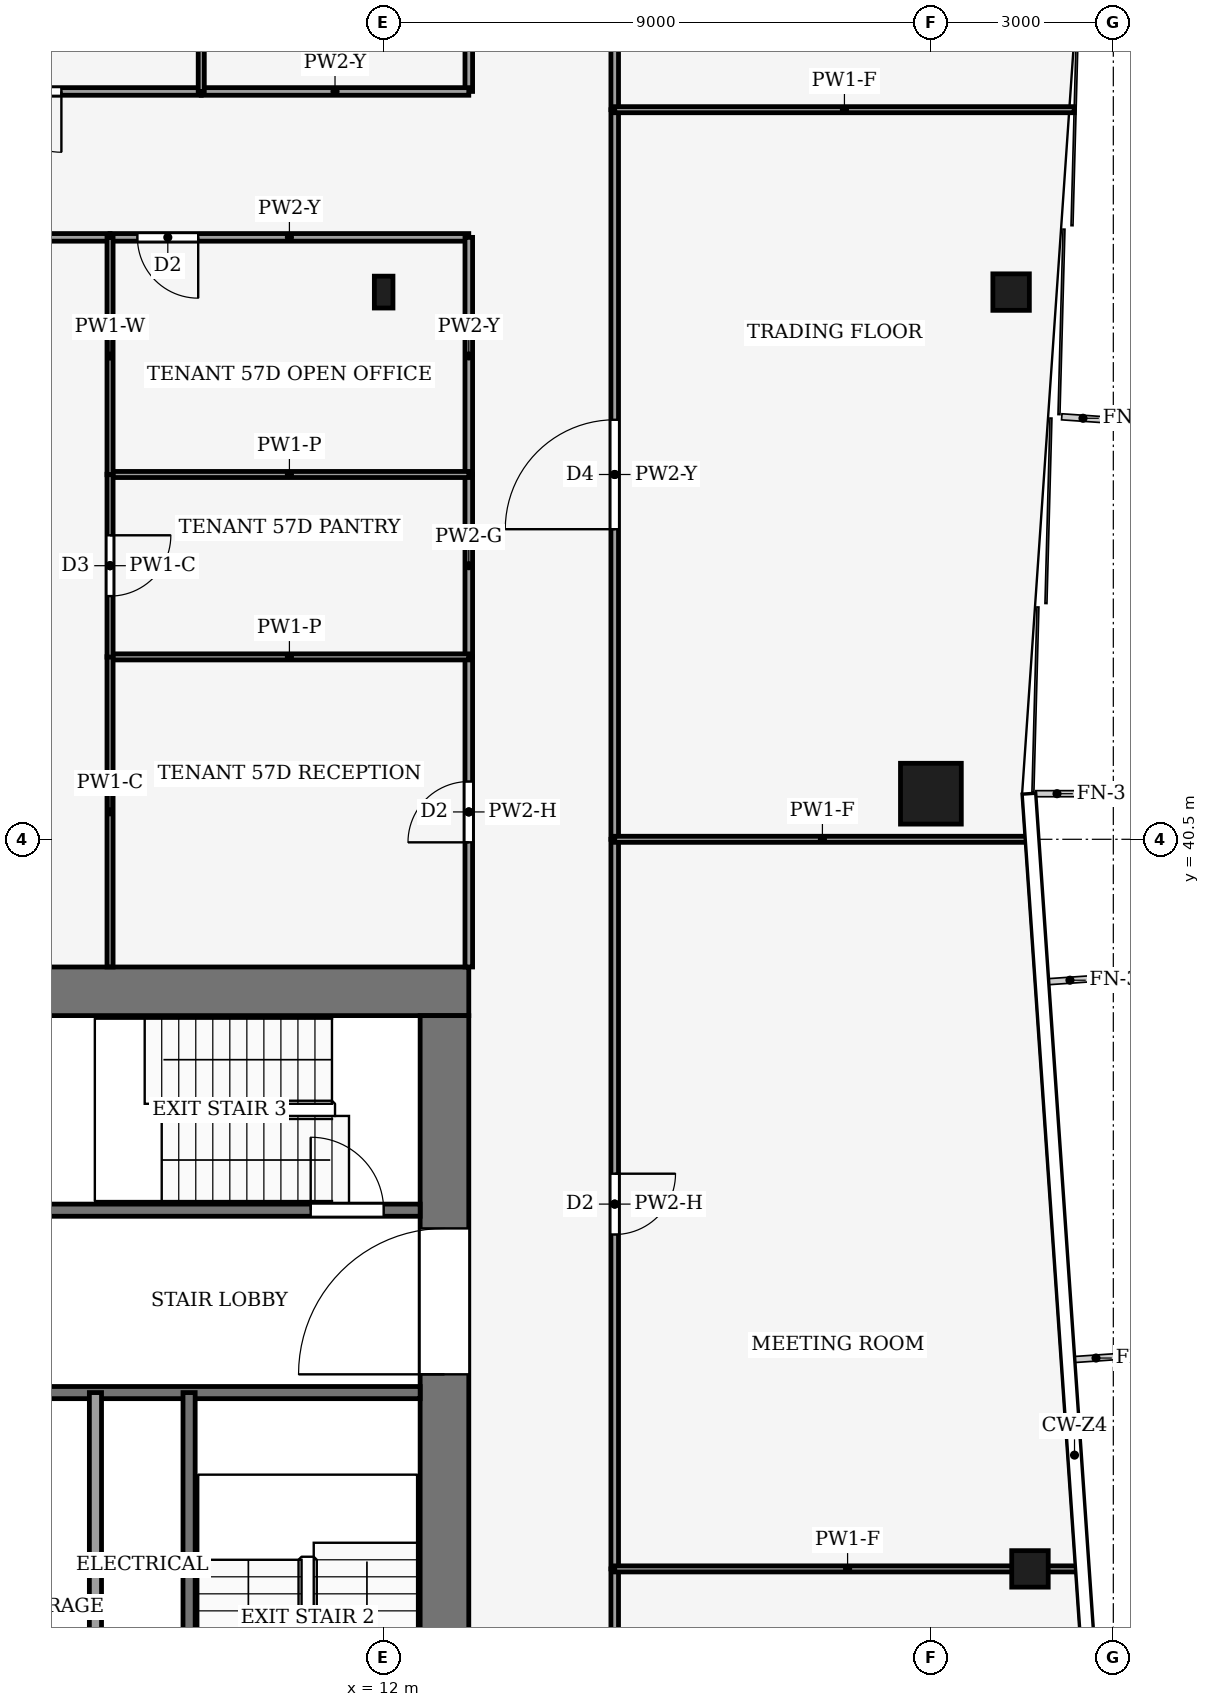
"""IFC4 building model, lengths in metres.
Left out: names, types, materials, properties, quantities, classifications, styles, units other than length and angle.
Written with IfcOpenShell. Run it as: python <this file> out.ifc"""

import sys

from ifc_helpers import new_model, si_unit, direction, frame, frame_2d, origin, origin_2d, place, context, subcontext, project, spatial, rectangle, hollow_rectangle, i_section, extrude, element, fill, save


model = new_model("IFC4")
c1 = context("Model", 3, precision=1e-05, world=origin(), true_north=direction((0.0, 1.0)))
c2 = subcontext(c1, "Body", "Model", "MODEL_VIEW")
j1 = project(units=[si_unit("LENGTHUNIT", "METRE"), si_unit("PLANEANGLEUNIT", "RADIAN")], contexts=[c1])
p1 = place(None, origin())
s1 = spatial("IfcSite", under=j1, at=p1, CompositionType="ELEMENT")
p2 = place(p1, origin())
s2 = spatial("IfcBuilding", under=s1, at=p2, CompositionType="ELEMENT")
p3 = place(p2, frame((0.0, 0.0, 250.0)))
s3 = spatial("IfcBuildingStorey", under=s2, at=p3, CompositionType="ELEMENT", Elevation=250.0)
p4 = place(p3, frame((-13.4, 38.0, -0.13), z_axis=(0.0, 0.0, 1.0), x_axis=(1.0, 0.0, 0.0)))
e1 = element("IfcWall", 1, at=p4, inside=s3, PredefinedType="SHEAR", context=c2, shape_type="SweptSolid", body=[
    extrude(rectangle(XDim=26.8, YDim=0.8, at=frame_2d((13.4, 0.0))), origin(), (0.0, 0.0, 1.0), 4.0),
])
p5 = place(p3, frame((13.0, 18.4, -0.13), z_axis=(0.0, 0.0, 1.0), x_axis=(0.0, 1.0, 0.0)))
e2 = element("IfcWall", 2, at=p5, inside=s3, PredefinedType="SHEAR", context=c2, shape_type="SweptSolid", body=[
    extrude(rectangle(XDim=19.2, YDim=0.8, at=frame_2d((9.6, 0.0))), origin(), (0.0, 0.0, 1.0), 4.0),
])
p6 = place(p5, frame((2.8, 0.0, 0.13)))
e3 = element("IfcOpeningElement", 3, at=p6, cuts=e2, PredefinedType="OPENING", context=c2, shape_type="SweptSolid", body=[
    extrude(rectangle(XDim=2.4, YDim=2.4, at=frame_2d((1.2, 1.2))), frame((0.0, 0.41, 0.0), z_axis=(0.0, -1.0, 0.0), x_axis=(1.0, 0.0, 0.0)), (0.0, 0.0, 1.0), 0.82),
])
p7 = place(p5, frame((13.3, 0.0, 0.13)))
e4 = element("IfcOpeningElement", 4, at=p7, cuts=e2, PredefinedType="OPENING", context=c2, shape_type="SweptSolid", body=[
    extrude(rectangle(XDim=2.4, YDim=2.4, at=frame_2d((1.2, 1.2))), frame((0.0, 0.41, 0.0), z_axis=(0.0, -1.0, 0.0), x_axis=(1.0, 0.0, 0.0)), (0.0, 0.0, 1.0), 0.82),
])
p8 = place(p3, frame((21.0, 41.25, 0.0), z_axis=(0.0, 0.0, 1.0), x_axis=(1.0, 0.0, 0.0)))
e5 = element("IfcColumn", 5, at=p8, inside=s3, PredefinedType="COLUMN", context=c2, shape_type="SweptSolid", body=[
    extrude(hollow_rectangle(XDim=1.0, YDim=1.0, WallThickness=0.045, at=origin_2d()), origin(), (0.0, 0.0, 1.0), 4.0),
])
for number, where, z_axis, x_axis in (
    (6, (22.629, 28.5, 0.0), (0.0, 0.0, 1.0), (1.0, 0.0, 0.0)),
    (7, (22.319, 49.5, 0.0), (0.0, 0.0, 1.0), (1.0, 0.0, 0.0)),
):
    element("IfcColumn", number, at=place(p3, frame(where, z_axis=z_axis, x_axis=x_axis)), inside=s3, PredefinedType="COLUMN", context=c2, shape_type="SweptSolid", body=[
        extrude(hollow_rectangle(XDim=0.6, YDim=0.6, WallThickness=0.025, at=origin_2d()), origin(), (0.0, 0.0, 1.0), 4.0),
    ])
p9 = place(p3, frame((12.0, 49.5, 0.0), z_axis=(0.0, 0.0, 1.0), x_axis=(1.0, 0.0, 0.0)))
e8 = element("IfcColumn", 8, at=p9, inside=s3, PredefinedType="COLUMN", context=c2, shape_type="SweptSolid", body=[
    extrude(i_section(OverallWidth=0.306, OverallDepth=0.524, WebThickness=0.012, FlangeThickness=0.04, FilletRadius=0.027, at=origin_2d()), origin(), (0.0, 0.0, 1.0), 4.0),
])
p10 = place(p3, frame((6.0, 31.4, 0.0), z_axis=(0.0, 0.0, 1.0), x_axis=(1.0, 0.0, 0.0)))
e9 = element("IfcWall", 9, at=p10, inside=s3, PredefinedType="PARTITIONING", context=c2, shape_type="SweptSolid", body=[
    extrude(rectangle(XDim=6.6, YDim=0.2, at=frame_2d((3.3, 0.0))), origin(), (0.0, 0.0, 1.0), 3.87),
])
p11 = place(p3, frame((6.0, 34.4, 0.0), z_axis=(0.0, 0.0, 1.0), x_axis=(1.0, 0.0, 0.0)))
e10 = element("IfcWall", 10, at=p11, inside=s3, PredefinedType="PARTITIONING", context=c2, shape_type="SweptSolid", body=[
    extrude(rectangle(XDim=6.6, YDim=0.2, at=frame_2d((3.3, 0.0))), origin(), (0.0, 0.0, 1.0), 3.87),
])
p12 = place(p11, frame((4.8, 0.0, 0.0)))
e11 = element("IfcOpeningElement", 11, at=p12, cuts=e10, PredefinedType="OPENING", context=c2, shape_type="SweptSolid", body=[
    extrude(rectangle(XDim=1.2, YDim=2.2, at=frame_2d((0.6, 1.1))), frame((0.0, 0.11, 0.0), z_axis=(0.0, -1.0, 0.0), x_axis=(1.0, 0.0, 0.0)), (0.0, 0.0, 1.0), 0.22),
])
for number, where, z_axis, x_axis in (
    (12, (7.26, 24.0, 0.0), (0.0, 0.0, 1.0), (0.0, 1.0, 0.0)),
    (13, (8.8, 24.0, 0.0), (0.0, 0.0, 1.0), (0.0, 1.0, 0.0)),
):
    element("IfcWall", number, at=place(p3, frame(where, z_axis=z_axis, x_axis=x_axis)), inside=s3, PredefinedType="PARTITIONING", context=c2, shape_type="SweptSolid", body=[
        extrude(rectangle(XDim=7.4, YDim=0.2, at=frame_2d((3.7, 0.0))), origin(), (0.0, 0.0, 1.0), 3.87),
    ])
p13 = place(p3, frame((15.8, 16.5, 0.0), z_axis=(0.0, 0.0, 1.0), x_axis=(0.0, 1.0, 0.0)))
e14 = element("IfcWall", 14, at=p13, inside=s3, PredefinedType="PARTITIONING", context=c2, shape_type="SweptSolid", body=[
    extrude(rectangle(XDim=12.0, YDim=0.125, at=frame_2d((6.0, 0.0))), origin(), (0.0, 0.0, 1.0), 3.14),
])
p14 = place(p13, frame((5.1, 0.0, 0.0)))
e15 = element("IfcOpeningElement", 15, at=p14, cuts=e14, PredefinedType="OPENING", context=c2, shape_type="SweptSolid", body=[
    extrude(rectangle(XDim=1.8, YDim=2.1, at=frame_2d((0.9, 1.05))), frame((0.0, 0.073, 0.0), z_axis=(0.0, -1.0, 0.0), x_axis=(1.0, 0.0, 0.0)), (0.0, 0.0, 1.0), 0.145),
])
p15 = place(p3, frame((15.8, 40.5, 0.0), z_axis=(0.0, 0.0, 1.0), x_axis=(0.0, -1.0, 0.0)))
e16 = element("IfcWall", 16, at=p15, inside=s3, PredefinedType="PARTITIONING", context=c2, shape_type="SweptSolid", body=[
    extrude(rectangle(XDim=12.0, YDim=0.125, at=frame_2d((6.0, 0.0))), origin(), (0.0, 0.0, 1.0), 3.14),
])
p16 = place(p15, frame((5.5, 0.0, 0.0)))
e17 = element("IfcOpeningElement", 17, at=p16, cuts=e16, PredefinedType="OPENING", context=c2, shape_type="SweptSolid", body=[
    extrude(rectangle(XDim=1.0, YDim=2.1, at=frame_2d((0.5, 1.05))), frame((0.0, 0.073, 0.0), z_axis=(0.0, -1.0, 0.0), x_axis=(1.0, 0.0, 0.0)), (0.0, 0.0, 1.0), 0.145),
])
p17 = place(p3, frame((15.8, 40.5, 0.0), z_axis=(0.0, 0.0, 1.0), x_axis=(0.0, 1.0, 0.0)))
e18 = element("IfcWall", 18, at=p17, inside=s3, PredefinedType="PARTITIONING", context=c2, shape_type="SweptSolid", body=[
    extrude(rectangle(XDim=12.0, YDim=0.125, at=frame_2d((6.0, 0.0))), origin(), (0.0, 0.0, 1.0), 3.24),
])
p18 = place(p17, frame((5.1, 0.0, 0.0)))
e19 = element("IfcOpeningElement", 19, at=p18, cuts=e18, PredefinedType="OPENING", context=c2, shape_type="SweptSolid", body=[
    extrude(rectangle(XDim=1.8, YDim=2.1, at=frame_2d((0.9, 1.05))), frame((0.0, 0.073, 0.0), z_axis=(0.0, -1.0, 0.0), x_axis=(1.0, 0.0, 0.0)), (0.0, 0.0, 1.0), 0.145),
])
p19 = place(p3, frame((15.8, 52.5, 0.0), z_axis=(0.0, 0.0, 1.0), x_axis=(0.0, 1.0, 0.0)))
e20 = element("IfcWall", 20, at=p19, inside=s3, PredefinedType="PARTITIONING", context=c2, shape_type="SweptSolid", body=[
    extrude(rectangle(XDim=16.397, YDim=0.125, at=frame_2d((8.198, 0.0))), origin(), (0.0, 0.0, 1.0), 3.04),
])
p20 = place(p19, frame((7.233, 0.0, 0.0)))
e21 = element("IfcOpeningElement", 21, at=p20, cuts=e20, PredefinedType="OPENING", context=c2, shape_type="SweptSolid", body=[
    extrude(rectangle(XDim=1.8, YDim=2.1, at=frame_2d((0.9, 1.05))), frame((0.0, 0.073, 0.0), z_axis=(0.0, -1.0, 0.0), x_axis=(1.0, 0.0, 0.0)), (0.0, 0.0, 1.0), 0.145),
])
p21 = place(p3, frame((13.4, 38.4, 0.0), z_axis=(0.0, 0.0, 1.0), x_axis=(0.0, 1.0, 0.0)))
e22 = element("IfcWall", 22, at=p21, inside=s3, PredefinedType="PARTITIONING", context=c2, shape_type="SweptSolid", body=[
    extrude(rectangle(XDim=5.1, YDim=0.125, at=frame_2d((2.55, 0.0))), origin(), (0.0, 0.0, 1.0), 3.14),
])
p22 = place(p21, frame((2.05, 0.0, 0.0)))
e23 = element("IfcOpeningElement", 23, at=p22, cuts=e22, PredefinedType="OPENING", context=c2, shape_type="SweptSolid", body=[
    extrude(rectangle(XDim=1.0, YDim=2.1, at=frame_2d((0.5, 1.05))), frame((0.0, 0.073, 0.0), z_axis=(0.0, -1.0, 0.0), x_axis=(1.0, 0.0, 0.0)), (0.0, 0.0, 1.0), 0.145),
])
p23 = place(p3, frame((13.4, 43.5, 0.0), z_axis=(0.0, 0.0, 1.0), x_axis=(0.0, 1.0, 0.0)))
e24 = element("IfcWall", 24, at=p23, inside=s3, PredefinedType="PARTITIONING", context=c2, shape_type="SweptSolid", body=[
    extrude(rectangle(XDim=3.0, YDim=0.125, at=frame_2d((1.5, 0.0))), origin(), (0.0, 0.0, 1.0), 3.87),
])
p24 = place(p3, frame((13.4, 50.4, 0.0), z_axis=(0.0, 0.0, 1.0), x_axis=(-1.0, 0.0, 0.0)))
e25 = element("IfcWall", 25, at=p24, inside=s3, PredefinedType="PARTITIONING", context=c2, shape_type="SweptSolid", body=[
    extrude(rectangle(XDim=5.9, YDim=0.125, at=frame_2d((2.95, 0.0))), origin(), (0.0, 0.0, 1.0), 3.24),
])
p25 = place(p24, frame((4.45, 0.0, 0.0)))
e26 = element("IfcOpeningElement", 26, at=p25, cuts=e25, PredefinedType="OPENING", context=c2, shape_type="SweptSolid", body=[
    extrude(rectangle(XDim=1.0, YDim=2.1, at=frame_2d((0.5, 1.05))), frame((0.0, 0.073, 0.0), z_axis=(0.0, -1.0, 0.0), x_axis=(1.0, 0.0, 0.0)), (0.0, 0.0, 1.0), 0.145),
])
p26 = place(p3, frame((13.4, 46.5, 0.0), z_axis=(0.0, 0.0, 1.0), x_axis=(0.0, 1.0, 0.0)))
e27 = element("IfcWall", 27, at=p26, inside=s3, PredefinedType="PARTITIONING", context=c2, shape_type="SweptSolid", body=[
    extrude(rectangle(XDim=3.9, YDim=0.125, at=frame_2d((1.95, 0.0))), origin(), (0.0, 0.0, 1.0), 3.24),
])
p27 = place(p3, frame((7.5, 50.4, 0.0), z_axis=(0.0, 0.0, 1.0), x_axis=(-1.0, 0.0, 0.0)))
e28 = element("IfcWall", 28, at=p27, inside=s3, PredefinedType="PARTITIONING", context=c2, shape_type="SweptSolid", body=[
    extrude(rectangle(XDim=7.5, YDim=0.125, at=frame_2d((3.75, 0.0))), origin(), (0.0, 0.0, 1.0), 3.24),
])
p28 = place(p27, frame((2.85, 0.0, 0.0)))
e29 = element("IfcOpeningElement", 29, at=p28, cuts=e28, PredefinedType="OPENING", context=c2, shape_type="SweptSolid", body=[
    extrude(rectangle(XDim=1.0, YDim=2.1, at=frame_2d((0.5, 1.05))), frame((0.0, 0.073, 0.0), z_axis=(0.0, -1.0, 0.0), x_axis=(1.0, 0.0, 0.0)), (0.0, 0.0, 1.0), 0.145),
])
p29 = place(p3, frame((9.0, 52.8, 0.0), z_axis=(0.0, 0.0, 1.0), x_axis=(-1.0, 0.0, 0.0)))
e30 = element("IfcWall", 30, at=p29, inside=s3, PredefinedType="PARTITIONING", context=c2, shape_type="SweptSolid", body=[
    extrude(rectangle(XDim=12.0, YDim=0.125, at=frame_2d((6.0, 0.0))), origin(), (0.0, 0.0, 1.0), 3.24),
])
p30 = place(p29, frame((2.3, 0.0, 0.0)))
e31 = element("IfcOpeningElement", 31, at=p30, cuts=e30, PredefinedType="OPENING", context=c2, shape_type="SweptSolid", body=[
    extrude(rectangle(XDim=1.0, YDim=2.1, at=frame_2d((0.5, 1.05))), frame((0.0, 0.073, 0.0), z_axis=(0.0, -1.0, 0.0), x_axis=(1.0, 0.0, 0.0)), (0.0, 0.0, 1.0), 0.145),
])
p31 = place(p3, frame((13.4, 52.8, 0.0), z_axis=(0.0, 0.0, 1.0), x_axis=(0.0, 1.0, 0.0)))
e32 = element("IfcWall", 32, at=p31, inside=s3, PredefinedType="PARTITIONING", context=c2, shape_type="SweptSolid", body=[
    extrude(rectangle(XDim=5.7, YDim=0.125, at=frame_2d((2.85, 0.0))), origin(), (0.0, 0.0, 1.0), 3.87),
])
p32 = place(p31, frame((2.35, 0.0, 0.0)))
e33 = element("IfcOpeningElement", 33, at=p32, cuts=e32, PredefinedType="OPENING", context=c2, shape_type="SweptSolid", body=[
    extrude(rectangle(XDim=1.0, YDim=2.1, at=frame_2d((0.5, 1.05))), frame((0.0, 0.073, 0.0), z_axis=(0.0, -1.0, 0.0), x_axis=(1.0, 0.0, 0.0)), (0.0, 0.0, 1.0), 0.145),
])
p33 = place(p3, frame((13.4, 52.8, 0.0), z_axis=(0.0, 0.0, 1.0), x_axis=(-1.0, 0.0, 0.0)))
e34 = element("IfcWall", 34, at=p33, inside=s3, PredefinedType="PARTITIONING", context=c2, shape_type="SweptSolid", body=[
    extrude(rectangle(XDim=4.4, YDim=0.125, at=frame_2d((2.2, 0.0))), origin(), (0.0, 0.0, 1.0), 3.24),
])
p34 = place(p3, frame((23.459, 28.5, 0.0), z_axis=(0.0, 0.0, 1.0), x_axis=(-1.0, 0.0, 0.0)))
e35 = element("IfcWall", 35, at=p34, inside=s3, PredefinedType="PARTITIONING", context=c2, shape_type="SweptSolid", body=[
    extrude(rectangle(XDim=7.659, YDim=0.1, at=frame_2d((3.83, 0.0))), origin(), (0.0, 0.0, 1.0), 3.04),
])
p35 = place(p3, frame((22.632, 40.5, 0.0), z_axis=(0.0, 0.0, 1.0), x_axis=(-1.0, 0.0, 0.0)))
e36 = element("IfcWall", 36, at=p35, inside=s3, PredefinedType="PARTITIONING", context=c2, shape_type="SweptSolid", body=[
    extrude(rectangle(XDim=6.832, YDim=0.1, at=frame_2d((3.416, 0.0))), origin(), (0.0, 0.0, 1.0), 3.04),
])
p36 = place(p3, frame((23.356, 52.5, 0.0), z_axis=(0.0, 0.0, 1.0), x_axis=(-1.0, 0.0, 0.0)))
e37 = element("IfcWall", 37, at=p36, inside=s3, PredefinedType="PARTITIONING", context=c2, shape_type="SweptSolid", body=[
    extrude(rectangle(XDim=7.556, YDim=0.1, at=frame_2d((3.778, 0.0))), origin(), (0.0, 0.0, 1.0), 3.04),
])
p37 = place(p3, frame((13.4, 43.5, 0.0), z_axis=(0.0, 0.0, 1.0), x_axis=(-1.0, 0.0, 0.0)))
e38 = element("IfcWall", 38, at=p37, inside=s3, PredefinedType="PARTITIONING", context=c2, shape_type="SweptSolid", body=[
    extrude(rectangle(XDim=5.9, YDim=0.1, at=frame_2d((2.95, 0.0))), origin(), (0.0, 0.0, 1.0), 3.44),
])
p38 = place(p3, frame((7.5, 43.504, 0.0), z_axis=(0.0, 0.0, 1.0), x_axis=(0.0, -1.0, 0.0)))
e39 = element("IfcWall", 39, at=p38, inside=s3, PredefinedType="PARTITIONING", context=c2, shape_type="SweptSolid", body=[
    extrude(rectangle(XDim=5.104, YDim=0.1, at=frame_2d((2.552, 0.0))), origin(), (0.0, 0.0, 1.0), 3.87),
])
p39 = place(p3, frame((13.4, 46.5, 0.0), z_axis=(0.0, 0.0, 1.0), x_axis=(-1.0, 0.0, 0.0)))
e40 = element("IfcWall", 40, at=p39, inside=s3, PredefinedType="PARTITIONING", context=c2, shape_type="SweptSolid", body=[
    extrude(rectangle(XDim=5.9, YDim=0.1, at=frame_2d((2.95, 0.0))), origin(), (0.0, 0.0, 1.0), 3.44),
])
p40 = place(p3, frame((7.5, 46.504, 0.0), z_axis=(0.0, 0.0, 1.0), x_axis=(0.0, -1.0, 0.0)))
e41 = element("IfcWall", 41, at=p40, inside=s3, PredefinedType="PARTITIONING", context=c2, shape_type="SweptSolid", body=[
    extrude(rectangle(XDim=3.008, YDim=0.1, at=frame_2d((1.504, 0.0))), origin(), (0.0, 0.0, 1.0), 3.87),
])
p41 = place(p40, frame((1.004, 0.0, 0.0)))
e42 = element("IfcOpeningElement", 42, at=p41, cuts=e41, PredefinedType="OPENING", context=c2, shape_type="SweptSolid", body=[
    extrude(rectangle(XDim=1.0, YDim=2.1, at=frame_2d((0.5, 1.05))), frame((0.0, 0.06, 0.0), z_axis=(0.0, -1.0, 0.0), x_axis=(1.0, 0.0, 0.0)), (0.0, 0.0, 1.0), 0.12),
])
p42 = place(p3, frame((7.5, 50.4, 0.0), z_axis=(0.0, 0.0, 1.0), x_axis=(0.0, -1.0, 0.0)))
e43 = element("IfcWall", 43, at=p42, inside=s3, PredefinedType="PARTITIONING", context=c2, shape_type="SweptSolid", body=[
    extrude(rectangle(XDim=3.904, YDim=0.1, at=frame_2d((1.952, 0.0))), origin(), (0.0, 0.0, 1.0), 3.24),
])
p43 = place(p3, frame((9.0, 52.8, 0.0), z_axis=(0.0, 0.0, 1.0), x_axis=(0.0, 1.0, 0.0)))
e44 = element("IfcWall", 44, at=p43, inside=s3, PredefinedType="PARTITIONING", context=c2, shape_type="SweptSolid", body=[
    extrude(rectangle(XDim=5.7, YDim=0.1, at=frame_2d((2.85, 0.0))), origin(), (0.0, 0.0, 1.0), 3.87),
])
p44 = place(p12, origin())
e45 = element("IfcDoor", 45, at=p44, inside=s3, OperationType="SINGLE_SWING_RIGHT", PredefinedType="DOOR", context=c2, shape_type="SweptSolid", body=[
    extrude(rectangle(XDim=1.2, YDim=2.2, at=frame_2d((0.6, 1.1))), frame((0.0, 0.025, 0.0), z_axis=(0.0, -1.0, 0.0), x_axis=(1.0, 0.0, 0.0)), (0.0, 0.0, 1.0), 0.05),
])
fill(e11, e45)
p45 = place(p7, origin())
e46 = element("IfcDoor", 46, at=p45, inside=s3, OperationType="DOUBLE_DOOR_SINGLE_SWING", PredefinedType="DOOR", context=c2, shape_type="SweptSolid", body=[
    extrude(rectangle(XDim=2.4, YDim=2.4, at=frame_2d((1.2, 1.2))), frame((0.0, 0.025, 0.0), z_axis=(0.0, -1.0, 0.0), x_axis=(1.0, 0.0, 0.0)), (0.0, 0.0, 1.0), 0.05),
])
fill(e4, e46)
p46 = place(p16, origin())
e47 = element("IfcDoor", 47, at=p46, inside=s3, OperationType="SINGLE_SWING_LEFT", PredefinedType="DOOR", context=c2, shape_type="SweptSolid", body=[
    extrude(rectangle(XDim=1.0, YDim=2.1, at=frame_2d((0.5, 1.05))), frame((0.0, 0.025, 0.0), z_axis=(0.0, -1.0, 0.0), x_axis=(1.0, 0.0, 0.0)), (0.0, 0.0, 1.0), 0.05),
])
fill(e17, e47)
p47 = place(p18, origin())
e48 = element("IfcDoor", 48, at=p47, inside=s3, OperationType="DOUBLE_DOOR_SINGLE_SWING", PredefinedType="DOOR", context=c2, shape_type="SweptSolid", body=[
    extrude(rectangle(XDim=1.8, YDim=2.1, at=frame_2d((0.9, 1.05))), frame((0.0, 0.025, 0.0), z_axis=(0.0, -1.0, 0.0), x_axis=(1.0, 0.0, 0.0)), (0.0, 0.0, 1.0), 0.05),
])
fill(e19, e48)
p48 = place(p22, origin())
e49 = element("IfcDoor", 49, at=p48, inside=s3, OperationType="SINGLE_SWING_LEFT", PredefinedType="DOOR", context=c2, shape_type="SweptSolid", body=[
    extrude(rectangle(XDim=1.0, YDim=2.1, at=frame_2d((0.5, 1.05))), frame((0.0, 0.025, 0.0), z_axis=(0.0, -1.0, 0.0), x_axis=(1.0, 0.0, 0.0)), (0.0, 0.0, 1.0), 0.05),
])
fill(e23, e49)
p49 = place(p25, origin())
e50 = element("IfcDoor", 50, at=p49, inside=s3, OperationType="SINGLE_SWING_RIGHT", PredefinedType="DOOR", context=c2, shape_type="SweptSolid", body=[
    extrude(rectangle(XDim=1.0, YDim=2.1, at=frame_2d((0.5, 1.05))), frame((0.0, 0.025, 0.0), z_axis=(0.0, -1.0, 0.0), x_axis=(1.0, 0.0, 0.0)), (0.0, 0.0, 1.0), 0.05),
])
fill(e26, e50)
p50 = place(p30, origin())
e51 = element("IfcDoor", 51, at=p50, inside=s3, OperationType="SINGLE_SWING_LEFT", PredefinedType="DOOR", context=c2, shape_type="SweptSolid", body=[
    extrude(rectangle(XDim=1.0, YDim=2.1, at=frame_2d((0.5, 1.05))), frame((0.0, 0.025, 0.0), z_axis=(0.0, -1.0, 0.0), x_axis=(1.0, 0.0, 0.0)), (0.0, 0.0, 1.0), 0.05),
])
fill(e31, e51)
p51 = place(p41, origin())
e52 = element("IfcDoor", 52, at=p51, inside=s3, OperationType="SINGLE_SWING_LEFT", PredefinedType="DOOR", context=c2, shape_type="SweptSolid", body=[
    extrude(rectangle(XDim=1.0, YDim=2.1, at=frame_2d((0.5, 1.05))), frame((0.0, 0.025, 0.0), z_axis=(0.0, -1.0, 0.0), x_axis=(1.0, 0.0, 0.0)), (0.0, 0.0, 1.0), 0.05),
])
fill(e42, e52)
save(model, sys.argv[1])
